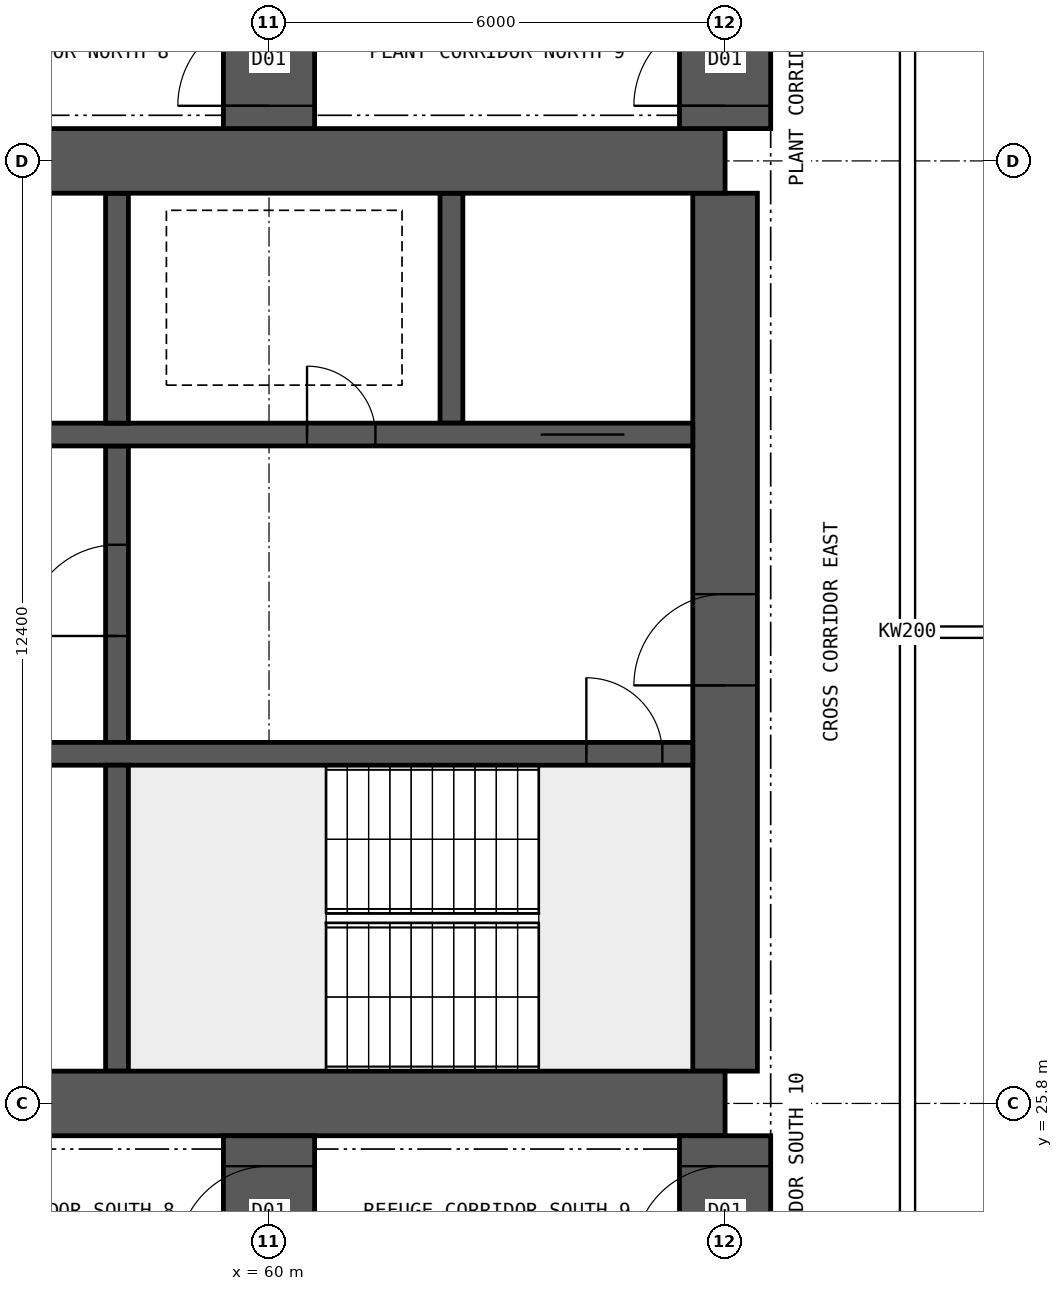
"""IFC4 building model, lengths in metres.
Left out: names, types, materials, properties, quantities, classifications, styles, units other than length and angle.
Written with IfcOpenShell. Run it as: python <this file> out.ifc"""

import sys

from ifc_helpers import new_model, si_unit, direction, frame, frame_2d, origin, place, context, subcontext, project, spatial, polyline, rectangle, outline, extrude, element, fill, save


model = new_model("IFC4")
c1 = context("Model", 3, precision=1e-05, world=origin(), true_north=direction((0.0, 1.0)))
c2 = subcontext(c1, "Body", "Model", "MODEL_VIEW")
j1 = project(units=[si_unit("LENGTHUNIT", "METRE"), si_unit("PLANEANGLEUNIT", "RADIAN")], contexts=[c1])
p1 = place(None, origin())
s1 = spatial("IfcSite", under=j1, at=p1, CompositionType="ELEMENT")
p2 = place(p1, origin())
s2 = spatial("IfcBuilding", under=s1, at=p2, CompositionType="ELEMENT")
p3 = place(p2, frame((0.0, 0.0, 201.1)))
s3 = spatial("IfcBuildingStorey", under=s2, at=p3, CompositionType="ELEMENT", Elevation=201.1)
for number, where, z_axis, x_axis in (
    (1, (18.0, 25.8, 0.0), (0.0, 0.0, 1.0), (1.0, 0.0, 0.0)),
    (2, (18.0, 38.2, 0.0), (0.0, 0.0, 1.0), (1.0, 0.0, 0.0)),
):
    element("IfcWall", number, at=place(p3, frame(where, z_axis=z_axis, x_axis=x_axis)), inside=s3, PredefinedType="SHEAR", context=c2, shape_type="SweptSolid", body=[
        extrude(rectangle(XDim=48.0, YDim=0.85, at=frame_2d((24.0, 0.0))), origin(), (0.0, 0.0, 1.0), 7.2),
    ])
p4 = place(p3, frame((66.0, 26.225, 0.0), z_axis=(0.0, 0.0, 1.0), x_axis=(0.0, 1.0, 0.0)))
e3 = element("IfcWall", 3, at=p4, inside=s3, PredefinedType="SHEAR", context=c2, shape_type="SweptSolid", body=[
    extrude(rectangle(XDim=11.55, YDim=0.85, at=frame_2d((5.775, 0.0))), origin(), (0.0, 0.0, 1.0), 7.2),
])
p5 = place(p4, frame((5.075, 0.0, 0.0)))
e4 = element("IfcOpeningElement", 4, at=p5, cuts=e3, PredefinedType="OPENING", context=c2, shape_type="SweptSolid", body=[
    extrude(rectangle(XDim=1.2, YDim=2.1, at=frame_2d((0.6, 1.05))), frame((0.0, 0.435, 0.0), z_axis=(0.0, -1.0, 0.0), x_axis=(1.0, 0.0, 0.0)), (0.0, 0.0, 1.0), 0.87),
])
p6 = place(p3, frame((18.425, 30.4, 0.0), z_axis=(0.0, 0.0, 1.0), x_axis=(1.0, 0.0, 0.0)))
e5 = element("IfcWall", 5, at=p6, inside=s3, PredefinedType="SHEAR", context=c2, shape_type="SweptSolid", body=[
    extrude(rectangle(XDim=47.15, YDim=0.3, at=frame_2d((23.575, 0.0))), origin(), (0.0, 0.0, 1.0), 7.2),
])
p7 = place(p6, frame((0.4, 0.0, 0.0)))
e6 = element("IfcOpeningElement", 6, at=p7, cuts=e5, PredefinedType="OPENING", context=c2, shape_type="SweptSolid", body=[
    extrude(rectangle(XDim=1.0, YDim=2.1, at=frame_2d((0.5, 1.05))), frame((0.0, 0.16, 0.0), z_axis=(0.0, -1.0, 0.0), x_axis=(1.0, 0.0, 0.0)), (0.0, 0.0, 1.0), 0.32),
])
p8 = place(p6, frame((45.75, 0.0, 0.0)))
e7 = element("IfcOpeningElement", 7, at=p8, cuts=e5, PredefinedType="OPENING", context=c2, shape_type="SweptSolid", body=[
    extrude(rectangle(XDim=1.0, YDim=2.1, at=frame_2d((0.5, 1.05))), frame((0.0, 0.16, 0.0), z_axis=(0.0, -1.0, 0.0), x_axis=(1.0, 0.0, 0.0)), (0.0, 0.0, 1.0), 0.32),
])
p9 = place(p6, frame((18.9, 0.0, 0.0)))
e8 = element("IfcOpeningElement", 8, at=p9, cuts=e5, PredefinedType="OPENING", context=c2, shape_type="SweptSolid", body=[
    extrude(rectangle(XDim=0.9, YDim=2.1, at=frame_2d((0.45, 1.05))), frame((0.0, 0.16, 0.0), z_axis=(0.0, -1.0, 0.0), x_axis=(1.0, 0.0, 0.0)), (0.0, 0.0, 1.0), 0.32),
])
p10 = place(p6, frame((30.192, 0.0, 0.0)))
e9 = element("IfcOpeningElement", 9, at=p10, cuts=e5, PredefinedType="OPENING", context=c2, shape_type="SweptSolid", body=[
    extrude(rectangle(XDim=1.1, YDim=2.1, at=frame_2d((0.55, 1.05))), frame((0.0, 0.16, 0.0), z_axis=(0.0, -1.0, 0.0), x_axis=(1.0, 0.0, 0.0)), (0.0, 0.0, 1.0), 0.32),
])
p11 = place(p6, frame((33.725, 0.0, 0.0)))
e10 = element("IfcOpeningElement", 10, at=p11, cuts=e5, PredefinedType="OPENING", context=c2, shape_type="SweptSolid", body=[
    extrude(rectangle(XDim=1.1, YDim=2.1, at=frame_2d((0.55, 1.05))), frame((0.0, 0.16, 0.0), z_axis=(0.0, -1.0, 0.0), x_axis=(1.0, 0.0, 0.0)), (0.0, 0.0, 1.0), 0.32),
])
p12 = place(p6, frame((37.258, 0.0, 0.0)))
e11 = element("IfcOpeningElement", 11, at=p12, cuts=e5, PredefinedType="OPENING", context=c2, shape_type="SweptSolid", body=[
    extrude(rectangle(XDim=1.1, YDim=2.1, at=frame_2d((0.55, 1.05))), frame((0.0, 0.16, 0.0), z_axis=(0.0, -1.0, 0.0), x_axis=(1.0, 0.0, 0.0)), (0.0, 0.0, 1.0), 0.32),
])
p13 = place(p3, frame((18.425, 34.6, 0.0), z_axis=(0.0, 0.0, 1.0), x_axis=(1.0, 0.0, 0.0)))
e12 = element("IfcWall", 12, at=p13, inside=s3, PredefinedType="SHEAR", context=c2, shape_type="SweptSolid", body=[
    extrude(rectangle(XDim=47.15, YDim=0.3, at=frame_2d((23.575, 0.0))), origin(), (0.0, 0.0, 1.0), 7.2),
])
p14 = place(p13, frame((0.9, 0.0, 0.0)))
e13 = element("IfcOpeningElement", 13, at=p14, cuts=e12, PredefinedType="OPENING", context=c2, shape_type="SweptSolid", body=[
    extrude(rectangle(XDim=1.1, YDim=2.1, at=frame_2d((0.55, 1.05))), frame((0.0, 0.16, 0.0), z_axis=(0.0, -1.0, 0.0), x_axis=(1.0, 0.0, 0.0)), (0.0, 0.0, 1.0), 0.32),
])
p15 = place(p13, frame((45.15, 0.0, 0.0)))
e14 = element("IfcOpeningElement", 14, at=p15, cuts=e12, PredefinedType="OPENING", context=c2, shape_type="SweptSolid", body=[
    extrude(rectangle(XDim=1.1, YDim=2.1, at=frame_2d((0.55, 1.05))), frame((0.0, 0.16, 0.0), z_axis=(0.0, -1.0, 0.0), x_axis=(1.0, 0.0, 0.0)), (0.0, 0.0, 1.0), 0.32),
])
p16 = place(p13, frame((4.175, 0.0, 0.0)))
e15 = element("IfcOpeningElement", 15, at=p16, cuts=e12, PredefinedType="OPENING", context=c2, shape_type="SweptSolid", body=[
    extrude(rectangle(XDim=0.9, YDim=2.1, at=frame_2d((0.45, 1.05))), frame((0.0, 0.16, 0.0), z_axis=(0.0, -1.0, 0.0), x_axis=(1.0, 0.0, 0.0)), (0.0, 0.0, 1.0), 0.32),
])
p17 = place(p13, frame((42.075, 0.0, 0.0)))
e16 = element("IfcOpeningElement", 16, at=p17, cuts=e12, PredefinedType="OPENING", context=c2, shape_type="SweptSolid", body=[
    extrude(rectangle(XDim=0.9, YDim=2.1, at=frame_2d((0.45, 1.05))), frame((0.0, 0.16, 0.0), z_axis=(0.0, -1.0, 0.0), x_axis=(1.0, 0.0, 0.0)), (0.0, 0.0, 1.0), 0.32),
])
p18 = place(p13, frame((8.95, 0.0, 0.0)))
e17 = element("IfcOpeningElement", 17, at=p18, cuts=e12, PredefinedType="OPENING", context=c2, shape_type="SweptSolid", body=[
    extrude(rectangle(XDim=0.9, YDim=2.1, at=frame_2d((0.45, 1.05))), frame((0.0, 0.16, 0.0), z_axis=(0.0, -1.0, 0.0), x_axis=(1.0, 0.0, 0.0)), (0.0, 0.0, 1.0), 0.32),
])
p19 = place(p13, frame((12.924, 0.0, 0.0)))
e18 = element("IfcOpeningElement", 18, at=p19, cuts=e12, PredefinedType="OPENING", context=c2, shape_type="SweptSolid", body=[
    extrude(rectangle(XDim=0.9, YDim=2.1, at=frame_2d((0.45, 1.05))), frame((0.0, 0.16, 0.0), z_axis=(0.0, -1.0, 0.0), x_axis=(1.0, 0.0, 0.0)), (0.0, 0.0, 1.0), 0.32),
])
p20 = place(p13, frame((16.571, 0.0, 0.0)))
e19 = element("IfcOpeningElement", 19, at=p20, cuts=e12, PredefinedType="OPENING", context=c2, shape_type="SweptSolid", body=[
    extrude(rectangle(XDim=0.9, YDim=2.1, at=frame_2d((0.45, 1.05))), frame((0.0, 0.16, 0.0), z_axis=(0.0, -1.0, 0.0), x_axis=(1.0, 0.0, 0.0)), (0.0, 0.0, 1.0), 0.32),
])
p21 = place(p13, frame((20.33, 0.0, 0.0)))
e20 = element("IfcOpeningElement", 20, at=p21, cuts=e12, PredefinedType="OPENING", context=c2, shape_type="SweptSolid", body=[
    extrude(rectangle(XDim=0.9, YDim=2.1, at=frame_2d((0.45, 1.05))), frame((0.0, 0.16, 0.0), z_axis=(0.0, -1.0, 0.0), x_axis=(1.0, 0.0, 0.0)), (0.0, 0.0, 1.0), 0.32),
])
p22 = place(p13, frame((24.736, 0.0, 0.0)))
e21 = element("IfcOpeningElement", 21, at=p22, cuts=e12, PredefinedType="OPENING", context=c2, shape_type="SweptSolid", body=[
    extrude(rectangle(XDim=0.9, YDim=2.1, at=frame_2d((0.45, 1.05))), frame((0.0, 0.16, 0.0), z_axis=(0.0, -1.0, 0.0), x_axis=(1.0, 0.0, 0.0)), (0.0, 0.0, 1.0), 0.32),
])
p23 = place(p13, frame((27.533, 0.0, 0.0)))
e22 = element("IfcOpeningElement", 22, at=p23, cuts=e12, PredefinedType="OPENING", context=c2, shape_type="SweptSolid", body=[
    extrude(rectangle(XDim=0.9, YDim=2.1, at=frame_2d((0.45, 1.05))), frame((0.0, 0.16, 0.0), z_axis=(0.0, -1.0, 0.0), x_axis=(1.0, 0.0, 0.0)), (0.0, 0.0, 1.0), 0.32),
])
p24 = place(p13, frame((29.906, 0.0, 0.0)))
e23 = element("IfcOpeningElement", 23, at=p24, cuts=e12, PredefinedType="OPENING", context=c2, shape_type="SweptSolid", body=[
    extrude(rectangle(XDim=0.9, YDim=2.1, at=frame_2d((0.45, 1.05))), frame((0.0, 0.16, 0.0), z_axis=(0.0, -1.0, 0.0), x_axis=(1.0, 0.0, 0.0)), (0.0, 0.0, 1.0), 0.32),
])
p25 = place(p13, frame((35.376, 0.0, 0.0)))
e24 = element("IfcOpeningElement", 24, at=p25, cuts=e12, PredefinedType="OPENING", context=c2, shape_type="SweptSolid", body=[
    extrude(rectangle(XDim=0.9, YDim=2.1, at=frame_2d((0.45, 1.05))), frame((0.0, 0.16, 0.0), z_axis=(0.0, -1.0, 0.0), x_axis=(1.0, 0.0, 0.0)), (0.0, 0.0, 1.0), 0.32),
])
p26 = place(p3, frame((58.0, 26.225, 0.0), z_axis=(0.0, 0.0, 1.0), x_axis=(0.0, 1.0, 0.0)))
e25 = element("IfcWall", 25, at=p26, inside=s3, PredefinedType="SHEAR", context=c2, shape_type="SweptSolid", body=[
    extrude(rectangle(XDim=4.025, YDim=0.3, at=frame_2d((2.012, 0.0))), origin(), (0.0, 0.0, 1.0), 7.2),
])
p27 = place(p3, frame((58.0, 30.55, 0.0), z_axis=(0.0, 0.0, 1.0), x_axis=(0.0, 1.0, 0.0)))
e26 = element("IfcWall", 26, at=p27, inside=s3, PredefinedType="SHEAR", context=c2, shape_type="SweptSolid", body=[
    extrude(rectangle(XDim=3.9, YDim=0.3, at=frame_2d((1.95, 0.0))), origin(), (0.0, 0.0, 1.0), 7.2),
])
p28 = place(p27, frame((1.4, 0.0, 0.0)))
e27 = element("IfcOpeningElement", 27, at=p28, cuts=e26, PredefinedType="OPENING", context=c2, shape_type="SweptSolid", body=[
    extrude(rectangle(XDim=1.2, YDim=2.1, at=frame_2d((0.6, 1.05))), frame((0.0, 0.16, 0.0), z_axis=(0.0, -1.0, 0.0), x_axis=(1.0, 0.0, 0.0)), (0.0, 0.0, 1.0), 0.32),
])
for number, where, z_axis, x_axis in (
    (28, (62.4, 34.75, 0.0), (0.0, 0.0, 1.0), (0.0, 1.0, 0.0)),
    (29, (58.0, 34.75, 0.0), (0.0, 0.0, 1.0), (0.0, 1.0, 0.0)),
):
    element("IfcWall", number, at=place(p3, frame(where, z_axis=z_axis, x_axis=x_axis)), inside=s3, PredefinedType="SHEAR", context=c2, shape_type="SweptSolid", body=[
        extrude(rectangle(XDim=3.025, YDim=0.3, at=frame_2d((1.512, 0.0))), origin(), (0.0, 0.0, 1.0), 7.2),
    ])
p29 = place(p3, frame((60.0, 10.0, 0.0), z_axis=(0.0, 0.0, 1.0), x_axis=(0.0, 1.0, 0.0)))
e30 = element("IfcWall", 30, at=p29, inside=s3, PredefinedType="SHEAR", context=c2, shape_type="SweptSolid", body=[
    extrude(rectangle(XDim=15.375, YDim=1.2, at=frame_2d((7.688, 0.0))), origin(), (0.0, 0.0, 1.0), 7.2),
])
p30 = place(p29, frame((13.775, 0.0, 0.0)))
e31 = element("IfcOpeningElement", 31, at=p30, cuts=e30, PredefinedType="OPENING", context=c2, shape_type="SweptSolid", body=[
    extrude(rectangle(XDim=1.2, YDim=2.1, at=frame_2d((0.6, 1.05))), frame((0.0, 0.61, 0.0), z_axis=(0.0, -1.0, 0.0), x_axis=(1.0, 0.0, 0.0)), (0.0, 0.0, 1.0), 1.22),
])
p31 = place(p3, frame((60.0, 38.625, 0.0), z_axis=(0.0, 0.0, 1.0), x_axis=(0.0, 1.0, 0.0)))
e32 = element("IfcWall", 32, at=p31, inside=s3, PredefinedType="SHEAR", context=c2, shape_type="SweptSolid", body=[
    extrude(rectangle(XDim=15.375, YDim=1.2, at=frame_2d((7.688, 0.0))), origin(), (0.0, 0.0, 1.0), 7.2),
])
p32 = place(p31, frame((0.3, 0.0, 0.0)))
e33 = element("IfcOpeningElement", 33, at=p32, cuts=e32, PredefinedType="OPENING", context=c2, shape_type="SweptSolid", body=[
    extrude(rectangle(XDim=1.2, YDim=2.1, at=frame_2d((0.6, 1.05))), frame((0.0, 0.61, 0.0), z_axis=(0.0, -1.0, 0.0), x_axis=(1.0, 0.0, 0.0)), (0.0, 0.0, 1.0), 1.22),
])
p33 = place(p3, frame((66.0, 10.0, 0.0), z_axis=(0.0, 0.0, 1.0), x_axis=(0.0, 1.0, 0.0)))
e34 = element("IfcWall", 34, at=p33, inside=s3, PredefinedType="SHEAR", context=c2, shape_type="SweptSolid", body=[
    extrude(rectangle(XDim=15.375, YDim=1.2, at=frame_2d((7.688, 0.0))), origin(), (0.0, 0.0, 1.0), 7.2),
])
p34 = place(p33, frame((13.775, 0.0, 0.0)))
e35 = element("IfcOpeningElement", 35, at=p34, cuts=e34, PredefinedType="OPENING", context=c2, shape_type="SweptSolid", body=[
    extrude(rectangle(XDim=1.2, YDim=2.1, at=frame_2d((0.6, 1.05))), frame((0.0, 0.61, 0.0), z_axis=(0.0, -1.0, 0.0), x_axis=(1.0, 0.0, 0.0)), (0.0, 0.0, 1.0), 1.22),
])
p35 = place(p33, frame((3.95, 0.0, 0.0)))
e36 = element("IfcOpeningElement", 36, at=p35, cuts=e34, PredefinedType="OPENING", context=c2, shape_type="SweptSolid", body=[
    extrude(rectangle(XDim=1.2, YDim=2.1, at=frame_2d((0.6, 1.05))), frame((0.0, 0.61, 0.0), z_axis=(0.0, -1.0, 0.0), x_axis=(1.0, 0.0, 0.0)), (0.0, 0.0, 1.0), 1.22),
])
p36 = place(p3, frame((66.0, 38.625, 0.0), z_axis=(0.0, 0.0, 1.0), x_axis=(0.0, 1.0, 0.0)))
e37 = element("IfcWall", 37, at=p36, inside=s3, PredefinedType="SHEAR", context=c2, shape_type="SweptSolid", body=[
    extrude(rectangle(XDim=15.375, YDim=1.2, at=frame_2d((7.688, 0.0))), origin(), (0.0, 0.0, 1.0), 7.2),
])
p37 = place(p36, frame((0.3, 0.0, 0.0)))
e38 = element("IfcOpeningElement", 38, at=p37, cuts=e37, PredefinedType="OPENING", context=c2, shape_type="SweptSolid", body=[
    extrude(rectangle(XDim=1.2, YDim=2.1, at=frame_2d((0.6, 1.05))), frame((0.0, 0.61, 0.0), z_axis=(0.0, -1.0, 0.0), x_axis=(1.0, 0.0, 0.0)), (0.0, 0.0, 1.0), 1.22),
])
p38 = place(p36, frame((10.225, 0.0, 0.0)))
e39 = element("IfcOpeningElement", 39, at=p38, cuts=e37, PredefinedType="OPENING", context=c2, shape_type="SweptSolid", body=[
    extrude(rectangle(XDim=1.2, YDim=2.1, at=frame_2d((0.6, 1.05))), frame((0.0, 0.61, 0.0), z_axis=(0.0, -1.0, 0.0), x_axis=(1.0, 0.0, 0.0)), (0.0, 0.0, 1.0), 1.22),
])
p39 = place(p3, frame((68.4, 23.475, 0.0), z_axis=(0.0, 0.0, 1.0), x_axis=(0.0, 1.0, 0.0)))
e40 = element("IfcWall", 40, at=p39, inside=s3, PredefinedType="SOLIDWALL", context=c2, shape_type="SweptSolid", body=[
    extrude(rectangle(XDim=17.05, YDim=0.2, at=frame_2d((8.525, 0.0))), origin(), (0.0, 0.0, 1.0), 6.9),
])
p40 = place(p3, frame((68.5, 32.0, 0.0), z_axis=(0.0, 0.0, 1.0), x_axis=(1.0, 0.0, 0.0)))
e41 = element("IfcWall", 41, at=p40, inside=s3, PredefinedType="PARTITIONING", context=c2, shape_type="SweptSolid", body=[
    extrude(outline(polyline([(0.0, 0.0), (6.795, 0.0), (6.795, 6.9), (3.802, 6.9), (3.8, 6.45), (3.202, 6.45), (3.2, 6.9), (0.0, 6.9), (0.0, 0.0)])), frame((0.0, 0.075, 0.0), z_axis=(0.0, -1.0, 0.0), x_axis=(1.0, 0.0, 0.0)), (0.0, 0.0, 1.0), 0.15),
])
p41 = place(p5, origin())
e42 = element("IfcDoor", 42, at=p41, inside=s3, OperationType="SINGLE_SWING_LEFT", PredefinedType="DOOR", context=c2, shape_type="SweptSolid", body=[
    extrude(rectangle(XDim=1.2, YDim=2.1, at=frame_2d((0.6, 1.05))), frame((0.0, 0.025, 0.0), z_axis=(0.0, -1.0, 0.0), x_axis=(1.0, 0.0, 0.0)), (0.0, 0.0, 1.0), 0.05),
])
fill(e4, e42)
p42 = place(p8, origin())
e43 = element("IfcDoor", 43, at=p42, inside=s3, OperationType="SINGLE_SWING_LEFT", PredefinedType="DOOR", context=c2, shape_type="SweptSolid", body=[
    extrude(rectangle(XDim=1.0, YDim=2.1, at=frame_2d((0.5, 1.05))), frame((0.0, 0.025, 0.0), z_axis=(0.0, -1.0, 0.0), x_axis=(1.0, 0.0, 0.0)), (0.0, 0.0, 1.0), 0.05),
])
fill(e7, e43)
p43 = place(p15, origin())
e44 = element("IfcDoor", 44, at=p43, inside=s3, OperationType="DOUBLE_DOOR_SLIDING", PredefinedType="DOOR", context=c2, shape_type="SweptSolid", body=[
    extrude(rectangle(XDim=1.1, YDim=2.1, at=frame_2d((0.55, 1.05))), frame((0.0, 0.025, 0.0), z_axis=(0.0, -1.0, 0.0), x_axis=(1.0, 0.0, 0.0)), (0.0, 0.0, 1.0), 0.05),
])
fill(e14, e44)
p44 = place(p17, origin())
e45 = element("IfcDoor", 45, at=p44, inside=s3, OperationType="SINGLE_SWING_LEFT", PredefinedType="DOOR", context=c2, shape_type="SweptSolid", body=[
    extrude(rectangle(XDim=0.9, YDim=2.1, at=frame_2d((0.45, 1.05))), frame((0.0, 0.025, 0.0), z_axis=(0.0, -1.0, 0.0), x_axis=(1.0, 0.0, 0.0)), (0.0, 0.0, 1.0), 0.05),
])
fill(e16, e45)
p45 = place(p28, origin())
e46 = element("IfcDoor", 46, at=p45, inside=s3, OperationType="SINGLE_SWING_LEFT", PredefinedType="DOOR", context=c2, shape_type="SweptSolid", body=[
    extrude(rectangle(XDim=1.2, YDim=2.1, at=frame_2d((0.6, 1.05))), frame((0.0, 0.025, 0.0), z_axis=(0.0, -1.0, 0.0), x_axis=(1.0, 0.0, 0.0)), (0.0, 0.0, 1.0), 0.05),
])
fill(e27, e46)
p46 = place(p30, origin())
e47 = element("IfcDoor", 47, at=p46, inside=s3, OperationType="SINGLE_SWING_LEFT", PredefinedType="DOOR", context=c2, shape_type="SweptSolid", body=[
    extrude(rectangle(XDim=1.2, YDim=2.1, at=frame_2d((0.6, 1.05))), frame((0.0, 0.025, 0.0), z_axis=(0.0, -1.0, 0.0), x_axis=(1.0, 0.0, 0.0)), (0.0, 0.0, 1.0), 0.05),
])
fill(e31, e47)
p47 = place(p34, origin())
e48 = element("IfcDoor", 48, at=p47, inside=s3, OperationType="SINGLE_SWING_LEFT", PredefinedType="DOOR", context=c2, shape_type="SweptSolid", body=[
    extrude(rectangle(XDim=1.2, YDim=2.1, at=frame_2d((0.6, 1.05))), frame((0.0, 0.025, 0.0), z_axis=(0.0, -1.0, 0.0), x_axis=(1.0, 0.0, 0.0)), (0.0, 0.0, 1.0), 0.05),
])
fill(e35, e48)
p48 = place(p32, origin())
e49 = element("IfcDoor", 49, at=p48, inside=s3, OperationType="SINGLE_SWING_LEFT", PredefinedType="DOOR", context=c2, shape_type="SweptSolid", body=[
    extrude(rectangle(XDim=1.2, YDim=2.1, at=frame_2d((0.6, 1.05))), frame((0.0, 0.025, 0.0), z_axis=(0.0, -1.0, 0.0), x_axis=(1.0, 0.0, 0.0)), (0.0, 0.0, 1.0), 0.05),
])
fill(e33, e49)
p49 = place(p37, origin())
e50 = element("IfcDoor", 50, at=p49, inside=s3, OperationType="SINGLE_SWING_LEFT", PredefinedType="DOOR", context=c2, shape_type="SweptSolid", body=[
    extrude(rectangle(XDim=1.2, YDim=2.1, at=frame_2d((0.6, 1.05))), frame((0.0, 0.025, 0.0), z_axis=(0.0, -1.0, 0.0), x_axis=(1.0, 0.0, 0.0)), (0.0, 0.0, 1.0), 0.05),
])
fill(e38, e50)
save(model, sys.argv[1])
